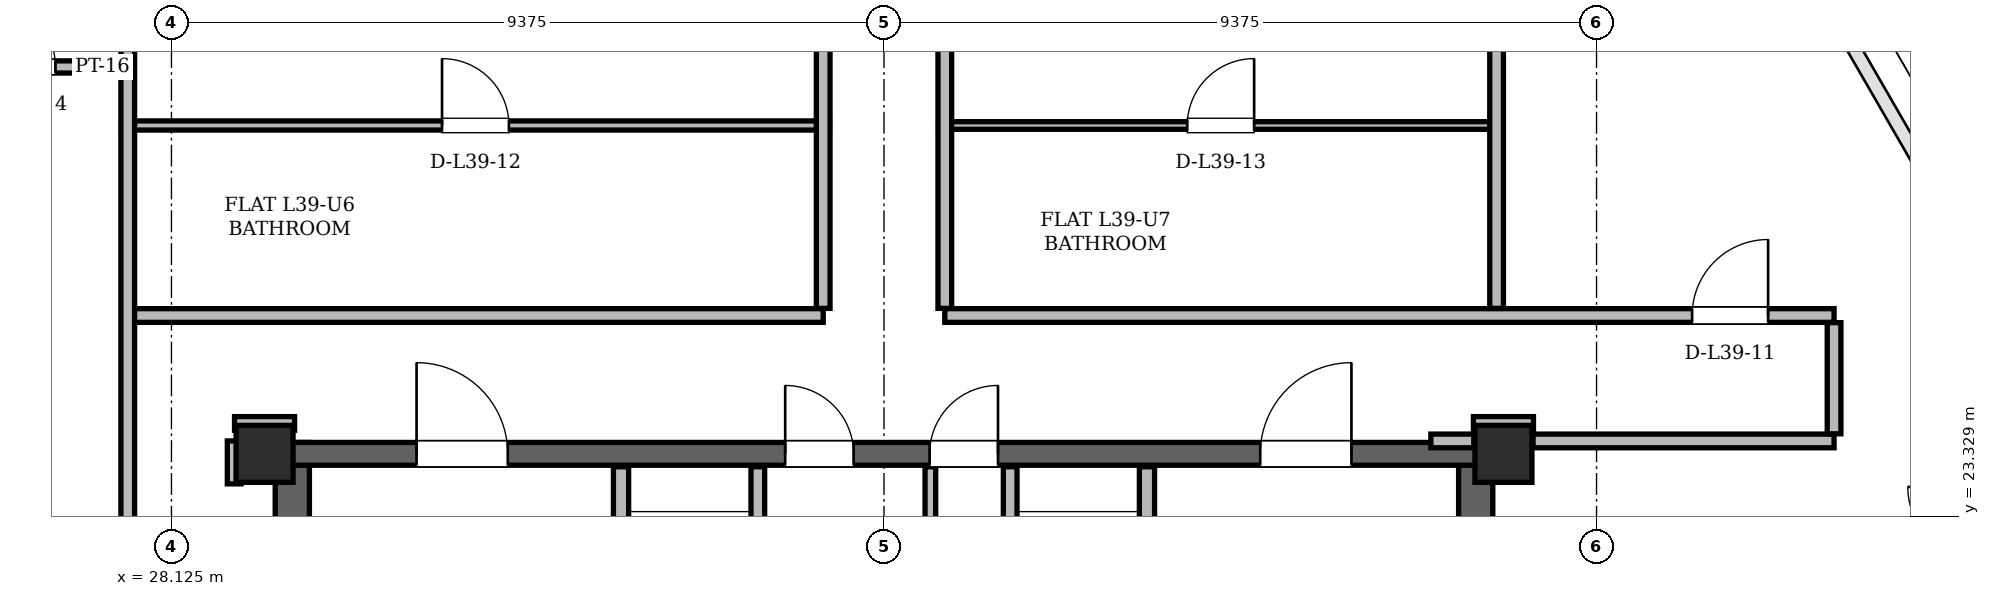
"""IFC4 building model, lengths in metres.
Left out: names, types, materials, properties, quantities, classifications, styles, units other than length and angle.
Written with IfcOpenShell. Run it as: python <this file> out.ifc"""

import sys

from ifc_helpers import new_model, si_unit, direction, frame, frame_2d, origin, origin_2d, place, context, subcontext, project, spatial, rectangle, hollow_rectangle, extrude, element, fill, save


model = new_model("IFC4")
c1 = context("Model", 3, precision=1e-05, world=origin(), true_north=direction((0.0, 1.0)))
c2 = subcontext(c1, "Body", "Model", "MODEL_VIEW")
j1 = project(units=[si_unit("LENGTHUNIT", "METRE"), si_unit("PLANEANGLEUNIT", "RADIAN")], contexts=[c1])
p1 = place(None, origin())
s1 = spatial("IfcSite", under=j1, at=p1, CompositionType="ELEMENT")
p2 = place(p1, origin())
s2 = spatial("IfcBuilding", under=s1, at=p2, CompositionType="ELEMENT")
p3 = place(p2, frame((0.0, 0.0, 149.4)))
s3 = spatial("IfcBuildingStorey", under=s2, at=p3, CompositionType="ELEMENT", Elevation=149.4)
for number, where, z_axis, x_axis in (
    (1, (45.65, 24.15, 0.0), (0.0, 0.0, 1.0), (1.0, 0.0, 0.0)),
    (2, (29.35, 24.15, 0.0), (0.0, 0.0, 1.0), (1.0, 0.0, 0.0)),
):
    element("IfcColumn", number, at=place(p3, frame(where, z_axis=z_axis, x_axis=x_axis)), inside=s3, PredefinedType="COLUMN", context=c2, shape_type="SweptSolid", body=[
        extrude(hollow_rectangle(XDim=0.75, YDim=0.75, WallThickness=0.06, at=origin_2d()), origin(), (0.0, 0.0, 1.0), 3.6),
    ])
for number, where, z_axis, x_axis in (
    (3, (29.715, 11.0, 0.0), (0.0, 0.0, 1.0), (0.0, 1.0, 0.0)),
    (4, (45.285, 11.0, 0.0), (0.0, 0.0, 1.0), (0.0, 1.0, 0.0)),
):
    element("IfcWall", number, at=place(p3, frame(where, z_axis=z_axis, x_axis=x_axis)), inside=s3, PredefinedType="SHEAR", context=c2, shape_type="SweptSolid", body=[
        extrude(rectangle(XDim=13.3, YDim=0.45, at=frame_2d((6.65, 0.0))), origin(), (0.0, 0.0, 1.0), 3.38),
    ])
p4 = place(p3, frame((29.65, 24.15, 0.0), z_axis=(0.0, 0.0, 1.0), x_axis=(1.0, 0.0, 0.0)))
e5 = element("IfcWall", 5, at=p4, inside=s3, PredefinedType="SHEAR", context=c2, shape_type="SweptSolid", body=[
    extrude(rectangle(XDim=15.7, YDim=0.3, at=frame_2d((7.85, 0.0))), origin(), (0.0, 0.0, 1.0), 3.38),
])
p5 = place(p4, frame((1.7, 0.0, 0.0)))
e6 = element("IfcOpeningElement", 6, at=p5, cuts=e5, PredefinedType="OPENING", context=c2, shape_type="SweptSolid", body=[
    extrude(rectangle(XDim=1.2, YDim=2.2, at=frame_2d((0.6, 1.1))), frame((0.0, 0.15, 0.0), z_axis=(0.0, -1.0, 0.0), x_axis=(1.0, 0.0, 0.0)), (0.0, 0.0, 1.0), 0.3),
])
p6 = place(p4, frame((12.8, 0.0, 0.0)))
e7 = element("IfcOpeningElement", 7, at=p6, cuts=e5, PredefinedType="OPENING", context=c2, shape_type="SweptSolid", body=[
    extrude(rectangle(XDim=1.2, YDim=2.2, at=frame_2d((0.6, 1.1))), frame((0.0, 0.15, 0.0), z_axis=(0.0, -1.0, 0.0), x_axis=(1.0, 0.0, 0.0)), (0.0, 0.0, 1.0), 0.3),
])
p7 = place(p4, frame((6.55, 0.0, 0.0)))
e8 = element("IfcOpeningElement", 8, at=p7, cuts=e5, PredefinedType="OPENING", context=c2, shape_type="SweptSolid", body=[
    extrude(rectangle(XDim=0.9, YDim=2.05, at=frame_2d((0.45, 1.025))), frame((0.0, 0.15, 0.0), z_axis=(0.0, -1.0, 0.0), x_axis=(1.0, 0.0, 0.0)), (0.0, 0.0, 1.0), 0.3),
])
p8 = place(p4, frame((8.45, 0.0, 0.0)))
e9 = element("IfcOpeningElement", 9, at=p8, cuts=e5, PredefinedType="OPENING", context=c2, shape_type="SweptSolid", body=[
    extrude(rectangle(XDim=0.9, YDim=2.05, at=frame_2d((0.45, 1.025))), frame((0.0, 0.15, 0.0), z_axis=(0.0, -1.0, 0.0), x_axis=(1.0, 0.0, 0.0)), (0.0, 0.0, 1.0), 0.3),
])
p9 = place(p3, frame((32.734, 43.331, 0.0), z_axis=(0.0, 0.0, 1.0), x_axis=(-0.499998697515, -0.866026155773, 0.0)))
e10 = element("IfcWall", 10, at=p9, inside=s3, PredefinedType="SOLIDWALL", context=c2, shape_type="SweptSolid", body=[
    extrude(rectangle(XDim=35.472, YDim=0.34, at=frame_2d((17.736, 0.0))), origin(), (0.0, 0.0, 1.0), 2.6),
])
p10 = place(p9, frame((8.034, 0.0, 0.0)))
e11 = element("IfcOpeningElement", 11, at=p10, cuts=e10, PredefinedType="OPENING", context=c2, shape_type="SweptSolid", body=[
    extrude(rectangle(XDim=1.5, YDim=2.2, at=frame_2d((0.75, 1.1))), frame((0.0, 0.17, 0.0), z_axis=(0.0, -1.0, 0.0), x_axis=(1.0, 0.0, 0.0)), (0.0, 0.0, 1.0), 0.34),
])
p11 = place(p9, frame((26.973, 0.0, 0.0)))
e12 = element("IfcOpeningElement", 12, at=p11, cuts=e10, PredefinedType="OPENING", context=c2, shape_type="SweptSolid", body=[
    extrude(rectangle(XDim=1.5, YDim=2.2, at=frame_2d((0.75, 1.1))), frame((0.0, 0.17, 0.0), z_axis=(0.0, -1.0, 0.0), x_axis=(1.0, 0.0, 0.0)), (0.0, 0.0, 1.0), 0.34),
])
p12 = place(p9, frame((33.0, 0.0, 0.85)))
e13 = element("IfcOpeningElement", 13, at=p12, cuts=e10, PredefinedType="OPENING", context=c2, shape_type="SweptSolid", body=[
    extrude(rectangle(XDim=1.2, YDim=1.48, at=frame_2d((0.6, 0.74))), frame((0.0, 0.17, 0.0), z_axis=(0.0, -1.0, 0.0), x_axis=(1.0, 0.0, 0.0)), (0.0, 0.0, 1.0), 0.34),
])
p13 = place(p9, frame((17.767, 0.0, 0.85)))
e14 = element("IfcOpeningElement", 14, at=p13, cuts=e10, PredefinedType="OPENING", context=c2, shape_type="SweptSolid", body=[
    extrude(rectangle(XDim=1.2, YDim=1.48, at=frame_2d((0.6, 0.74))), frame((0.0, 0.17, 0.0), z_axis=(0.0, -1.0, 0.0), x_axis=(1.0, 0.0, 0.0)), (0.0, 0.0, 1.0), 0.34),
])
p14 = place(p9, frame((11.513, 0.0, 0.85)))
e15 = element("IfcOpeningElement", 15, at=p14, cuts=e10, PredefinedType="OPENING", context=c2, shape_type="SweptSolid", body=[
    extrude(rectangle(XDim=1.2, YDim=1.48, at=frame_2d((0.6, 0.74))), frame((0.0, 0.17, 0.0), z_axis=(0.0, -1.0, 0.0), x_axis=(1.0, 0.0, 0.0)), (0.0, 0.0, 1.0), 0.34),
])
p15 = place(p9, frame((14.179, 0.0, 0.85)))
e16 = element("IfcOpeningElement", 16, at=p15, cuts=e10, PredefinedType="OPENING", context=c2, shape_type="SweptSolid", body=[
    extrude(rectangle(XDim=1.2, YDim=1.48, at=frame_2d((0.6, 0.74))), frame((0.0, 0.17, 0.0), z_axis=(0.0, -1.0, 0.0), x_axis=(1.0, 0.0, 0.0)), (0.0, 0.0, 1.0), 0.34),
])
p16 = place(p9, frame((2.823, 0.0, 0.85)))
e17 = element("IfcOpeningElement", 17, at=p16, cuts=e10, PredefinedType="OPENING", context=c2, shape_type="SweptSolid", body=[
    extrude(rectangle(XDim=1.6, YDim=1.64, at=frame_2d((0.8, 0.82))), frame((0.0, 0.17, 0.0), z_axis=(0.0, -1.0, 0.0), x_axis=(1.0, 0.0, 0.0)), (0.0, 0.0, 1.0), 0.34),
])
p17 = place(p3, frame((34.04, 19.48, 0.0), z_axis=(0.0, 0.0, 1.0), x_axis=(0.0, 1.0, 0.0)))
e18 = element("IfcWall", 18, at=p17, inside=s3, PredefinedType="PARTITIONING", context=c2, shape_type="SweptSolid", body=[
    extrude(rectangle(XDim=4.5, YDim=0.2, at=frame_2d((2.25, 0.0))), origin(), (0.0, 0.0, 1.0), 2.42),
])
p18 = place(p17, frame((2.12, 0.0, 0.0)))
e19 = element("IfcOpeningElement", 19, at=p18, cuts=e18, PredefinedType="OPENING", context=c2, shape_type="SweptSolid", body=[
    extrude(rectangle(XDim=1.1, YDim=2.2, at=frame_2d((0.55, 1.1))), frame((0.0, 0.1, 0.0), z_axis=(0.0, -1.0, 0.0), x_axis=(1.0, 0.0, 0.0)), (0.0, 0.0, 1.0), 0.2),
])
p19 = place(p3, frame((35.84, 20.96, 0.0), z_axis=(0.0, 0.0, 1.0), x_axis=(0.0, 1.0, 0.0)))
e20 = element("IfcWall", 20, at=p19, inside=s3, PredefinedType="PARTITIONING", context=c2, shape_type="SweptSolid", body=[
    extrude(rectangle(XDim=3.02, YDim=0.18, at=frame_2d((1.51, 0.0))), origin(), (0.0, 0.0, 1.0), 2.42),
])
p20 = place(p3, frame((40.96, 19.48, 0.0), z_axis=(0.0, 0.0, 1.0), x_axis=(0.0, 1.0, 0.0)))
e21 = element("IfcWall", 21, at=p20, inside=s3, PredefinedType="PARTITIONING", context=c2, shape_type="SweptSolid", body=[
    extrude(rectangle(XDim=4.5, YDim=0.2, at=frame_2d((2.25, 0.0))), origin(), (0.0, 0.0, 1.0), 2.42),
])
p21 = place(p20, frame((2.12, 0.0, 0.0)))
e22 = element("IfcOpeningElement", 22, at=p21, cuts=e21, PredefinedType="OPENING", context=c2, shape_type="SweptSolid", body=[
    extrude(rectangle(XDim=1.1, YDim=2.2, at=frame_2d((0.55, 1.1))), frame((0.0, 0.1, 0.0), z_axis=(0.0, -1.0, 0.0), x_axis=(1.0, 0.0, 0.0)), (0.0, 0.0, 1.0), 0.2),
])
p22 = place(p3, frame((39.16, 20.96, 0.0), z_axis=(0.0, 0.0, 1.0), x_axis=(0.0, 1.0, 0.0)))
e23 = element("IfcWall", 23, at=p22, inside=s3, PredefinedType="PARTITIONING", context=c2, shape_type="SweptSolid", body=[
    extrude(rectangle(XDim=3.02, YDim=0.18, at=frame_2d((1.51, 0.0))), origin(), (0.0, 0.0, 1.0), 2.42),
])
p23 = place(p3, frame((38.11, 21.06, 0.0), z_axis=(0.0, 0.0, 1.0), x_axis=(0.0, 1.0, 0.0)))
e24 = element("IfcWall", 24, at=p23, inside=s3, PredefinedType="PARTITIONING", context=c2, shape_type="SweptSolid", body=[
    extrude(rectangle(XDim=2.92, YDim=0.14, at=frame_2d((1.46, 0.0))), origin(), (0.0, 0.0, 1.0), 2.42),
])
p24 = place(p3, frame((44.695, 24.32, 0.0), z_axis=(0.0, 0.0, 1.0), x_axis=(1.0, 0.0, 0.0)))
e25 = element("IfcWall", 25, at=p24, inside=s3, PredefinedType="PARTITIONING", context=c2, shape_type="SweptSolid", body=[
    extrude(rectangle(XDim=0.565, YDim=0.18, at=frame_2d((0.282, 0.0))), origin(), (0.0, 0.0, 1.0), 2.42),
])
p25 = place(p3, frame((46.04, 24.32, 0.0), z_axis=(0.0, 0.0, 1.0), x_axis=(1.0, 0.0, 0.0)))
e26 = element("IfcWall", 26, at=p25, inside=s3, PredefinedType="PARTITIONING", context=c2, shape_type="SweptSolid", body=[
    extrude(rectangle(XDim=3.96, YDim=0.18, at=frame_2d((1.98, 0.0))), origin(), (0.0, 0.0, 1.0), 3.38),
])
for number, where, z_axis, x_axis in (
    (27, (28.955, 24.55, 0.0), (0.0, 0.0, 1.0), (1.0, 0.0, 0.0)),
    (28, (45.255, 24.55, 0.0), (0.0, 0.0, 1.0), (1.0, 0.0, 0.0)),
):
    element("IfcWall", number, at=place(p3, frame(where, z_axis=z_axis, x_axis=x_axis)), inside=s3, PredefinedType="PARTITIONING", context=c2, shape_type="SweptSolid", body=[
        extrude(rectangle(XDim=0.79, YDim=0.18, at=frame_2d((0.395, 0.0))), origin(), (0.0, 0.0, 1.0), 2.842),
    ])
p26 = place(p3, frame((27.55, 25.97, 0.0), z_axis=(0.0, 0.0, 1.0), x_axis=(1.0, 0.0, 0.0)))
e29 = element("IfcWall", 29, at=p26, inside=s3, PredefinedType="PARTITIONING", context=c2, shape_type="SweptSolid", body=[
    extrude(rectangle(XDim=9.15, YDim=0.18, at=frame_2d((4.575, 0.0))), origin(), (0.0, 0.0, 1.0), 2.842),
])
p27 = place(p3, frame((38.3, 25.97, 0.0), z_axis=(0.0, 0.0, 1.0), x_axis=(1.0, 0.0, 0.0)))
e30 = element("IfcWall", 30, at=p27, inside=s3, PredefinedType="PARTITIONING", context=c2, shape_type="SweptSolid", body=[
    extrude(rectangle(XDim=11.7, YDim=0.18, at=frame_2d((5.85, 0.0))), origin(), (0.0, 0.0, 1.0), 2.842),
])
p28 = place(p27, frame((9.832, 0.0, 0.0)))
e31 = element("IfcOpeningElement", 31, at=p28, cuts=e30, PredefinedType="OPENING", context=c2, shape_type="SweptSolid", body=[
    extrude(rectangle(XDim=1.0, YDim=2.18, at=frame_2d((0.5, 1.09))), frame((0.0, 0.09, 0.0), z_axis=(0.0, -1.0, 0.0), x_axis=(1.0, 0.0, 0.0)), (0.0, 0.0, 1.0), 0.18),
])
p29 = place(p3, frame((27.468, 28.47, 0.0), z_axis=(0.0, 0.0, 1.0), x_axis=(1.0, 0.0, 0.0)))
e32 = element("IfcWall", 32, at=p29, inside=s3, PredefinedType="PARTITIONING", context=c2, shape_type="SweptSolid", body=[
    extrude(rectangle(XDim=9.314, YDim=0.12, at=frame_2d((4.657, 0.0))), origin(), (0.0, 0.0, 1.0), 3.38),
])
p30 = place(p29, frame((4.217, 0.0, 0.0)))
e33 = element("IfcOpeningElement", 33, at=p30, cuts=e32, PredefinedType="OPENING", context=c2, shape_type="SweptSolid", body=[
    extrude(rectangle(XDim=0.88, YDim=2.08, at=frame_2d((0.44, 1.04))), frame((0.0, 0.06, 0.0), z_axis=(0.0, -1.0, 0.0), x_axis=(1.0, 0.0, 0.0)), (0.0, 0.0, 1.0), 0.12),
])
p31 = place(p3, frame((38.218, 28.47, 0.0), z_axis=(0.0, 0.0, 1.0), x_axis=(1.0, 0.0, 0.0)))
e34 = element("IfcWall", 34, at=p31, inside=s3, PredefinedType="PARTITIONING", context=c2, shape_type="SweptSolid", body=[
    extrude(rectangle(XDim=7.424, YDim=0.1, at=frame_2d((3.712, 0.0))), origin(), (0.0, 0.0, 1.0), 3.38),
])
p32 = place(p31, frame((3.272, 0.0, 0.0)))
e35 = element("IfcOpeningElement", 35, at=p32, cuts=e34, PredefinedType="OPENING", context=c2, shape_type="SweptSolid", body=[
    extrude(rectangle(XDim=0.88, YDim=2.08, at=frame_2d((0.44, 1.04))), frame((0.0, 0.05, 0.0), z_axis=(0.0, -1.0, 0.0), x_axis=(1.0, 0.0, 0.0)), (0.0, 0.0, 1.0), 0.1),
])
p33 = place(p3, frame((24.799, 29.24, 0.0), z_axis=(0.0, 0.0, 1.0), x_axis=(1.0, 0.0, 0.0)))
e36 = element("IfcWall", 36, at=p33, inside=s3, PredefinedType="PARTITIONING", context=c2, shape_type="SweptSolid", body=[
    extrude(rectangle(XDim=2.833, YDim=0.16, at=frame_2d((1.417, 0.0))), origin(), (0.0, 0.0, 1.0), 3.38),
])
p34 = place(p33, frame((0.92, 0.0, 0.0)))
e37 = element("IfcOpeningElement", 37, at=p34, cuts=e36, PredefinedType="OPENING", context=c2, shape_type="SweptSolid", body=[
    extrude(rectangle(XDim=0.88, YDim=2.08, at=frame_2d((0.44, 1.04))), frame((0.0, 0.08, 0.0), z_axis=(0.0, -1.0, 0.0), x_axis=(1.0, 0.0, 0.0)), (0.0, 0.0, 1.0), 0.16),
])
p35 = place(p3, frame((27.55, 18.544, 0.0), z_axis=(0.0, 0.0, 1.0), x_axis=(0.0, 1.0, 0.0)))
e38 = element("IfcWall", 38, at=p35, inside=s3, PredefinedType="PARTITIONING", context=c2, shape_type="SweptSolid", body=[
    extrude(rectangle(XDim=15.344, YDim=0.18, at=frame_2d((7.672, 0.0))), origin(), (0.0, 0.0, 1.0), 3.38),
])
p36 = place(p3, frame((28.95, 23.755, 0.0), z_axis=(0.0, 0.0, 1.0), x_axis=(0.0, 1.0, 0.0)))
e39 = element("IfcWall", 39, at=p36, inside=s3, PredefinedType="PARTITIONING", context=c2, shape_type="SweptSolid", body=[
    extrude(rectangle(XDim=0.565, YDim=0.18, at=frame_2d((0.283, 0.0))), origin(), (0.0, 0.0, 1.0), 3.38),
])
p37 = place(p3, frame((36.7, 26.064, 0.0), z_axis=(0.0, 0.0, 1.0), x_axis=(0.0, 1.0, 0.0)))
e40 = element("IfcWall", 40, at=p37, inside=s3, PredefinedType="PARTITIONING", context=c2, shape_type="SweptSolid", body=[
    extrude(rectangle(XDim=17.094, YDim=0.18, at=frame_2d((8.547, 0.0))), origin(), (0.0, 0.0, 1.0), 3.38),
])
p38 = place(p37, frame((7.15, 0.0, 0.0)))
e41 = element("IfcOpeningElement", 41, at=p38, cuts=e40, PredefinedType="OPENING", context=c2, shape_type="SweptSolid", body=[
    extrude(rectangle(XDim=1.0, YDim=2.18, at=frame_2d((0.5, 1.09))), frame((0.0, 0.09, 0.0), z_axis=(0.0, -1.0, 0.0), x_axis=(1.0, 0.0, 0.0)), (0.0, 0.0, 1.0), 0.18),
])
p39 = place(p3, frame((38.3, 26.064, 0.0), z_axis=(0.0, 0.0, 1.0), x_axis=(0.0, 1.0, 0.0)))
e42 = element("IfcWall", 42, at=p39, inside=s3, PredefinedType="PARTITIONING", context=c2, shape_type="SweptSolid", body=[
    extrude(rectangle(XDim=13.442, YDim=0.18, at=frame_2d((6.721, 0.0))), origin(), (0.0, 0.0, 1.0), 3.38),
])
p40 = place(p39, frame((7.15, 0.0, 0.0)))
e43 = element("IfcOpeningElement", 43, at=p40, cuts=e42, PredefinedType="OPENING", context=c2, shape_type="SweptSolid", body=[
    extrude(rectangle(XDim=1.0, YDim=2.18, at=frame_2d((0.5, 1.09))), frame((0.0, 0.09, 0.0), z_axis=(0.0, -1.0, 0.0), x_axis=(1.0, 0.0, 0.0)), (0.0, 0.0, 1.0), 0.18),
])
p41 = place(p3, frame((45.56, 26.064, 0.0), z_axis=(0.0, 0.0, 1.0), x_axis=(0.0, 1.0, 0.0)))
e44 = element("IfcWall", 44, at=p41, inside=s3, PredefinedType="PARTITIONING", context=c2, shape_type="SweptSolid", body=[
    extrude(rectangle(XDim=11.214, YDim=0.18, at=frame_2d((5.607, 0.0))), origin(), (0.0, 0.0, 1.0), 3.38),
])
p42 = place(p3, frame((50.0, 24.414, 0.0), z_axis=(0.0, 0.0, 1.0), x_axis=(0.0, 1.0, 0.0)))
e45 = element("IfcWall", 45, at=p42, inside=s3, PredefinedType="PARTITIONING", context=c2, shape_type="SweptSolid", body=[
    extrude(rectangle(XDim=1.462, YDim=0.18, at=frame_2d((0.731, 0.0))), origin(), (0.0, 0.0, 1.0), 3.38),
])
p43 = place(p5, origin())
e46 = element("IfcDoor", 46, at=p43, inside=s3, OperationType="SINGLE_SWING_LEFT", PredefinedType="DOOR", context=c2, shape_type="SweptSolid", body=[
    extrude(rectangle(XDim=1.2, YDim=2.2, at=frame_2d((0.6, 1.1))), frame((0.0, 0.025, 0.0), z_axis=(0.0, -1.0, 0.0), x_axis=(1.0, 0.0, 0.0)), (0.0, 0.0, 1.0), 0.05),
])
fill(e6, e46)
p44 = place(p6, origin())
e47 = element("IfcDoor", 47, at=p44, inside=s3, OperationType="SINGLE_SWING_RIGHT", PredefinedType="DOOR", context=c2, shape_type="SweptSolid", body=[
    extrude(rectangle(XDim=1.2, YDim=2.2, at=frame_2d((0.6, 1.1))), frame((0.0, 0.025, 0.0), z_axis=(0.0, -1.0, 0.0), x_axis=(1.0, 0.0, 0.0)), (0.0, 0.0, 1.0), 0.05),
])
fill(e7, e47)
p45 = place(p7, origin())
e48 = element("IfcDoor", 48, at=p45, inside=s3, OperationType="SINGLE_SWING_LEFT", PredefinedType="DOOR", context=c2, shape_type="SweptSolid", body=[
    extrude(rectangle(XDim=0.9, YDim=2.05, at=frame_2d((0.45, 1.025))), frame((0.0, 0.025, 0.0), z_axis=(0.0, -1.0, 0.0), x_axis=(1.0, 0.0, 0.0)), (0.0, 0.0, 1.0), 0.05),
])
fill(e8, e48)
p46 = place(p8, origin())
e49 = element("IfcDoor", 49, at=p46, inside=s3, OperationType="SINGLE_SWING_RIGHT", PredefinedType="DOOR", context=c2, shape_type="SweptSolid", body=[
    extrude(rectangle(XDim=0.9, YDim=2.05, at=frame_2d((0.45, 1.025))), frame((0.0, 0.025, 0.0), z_axis=(0.0, -1.0, 0.0), x_axis=(1.0, 0.0, 0.0)), (0.0, 0.0, 1.0), 0.05),
])
fill(e9, e49)
p47 = place(p28, origin())
e50 = element("IfcDoor", 50, at=p47, inside=s3, OperationType="SINGLE_SWING_RIGHT", PredefinedType="DOOR", context=c2, shape_type="SweptSolid", body=[
    extrude(rectangle(XDim=1.0, YDim=2.18, at=frame_2d((0.5, 1.09))), frame((0.0, 0.025, 0.0), z_axis=(0.0, -1.0, 0.0), x_axis=(1.0, 0.0, 0.0)), (0.0, 0.0, 1.0), 0.05),
])
fill(e31, e50)
p48 = place(p30, origin())
e51 = element("IfcDoor", 51, at=p48, inside=s3, OperationType="SINGLE_SWING_LEFT", PredefinedType="DOOR", context=c2, shape_type="SweptSolid", body=[
    extrude(rectangle(XDim=0.88, YDim=2.08, at=frame_2d((0.44, 1.04))), frame((0.0, 0.025, 0.0), z_axis=(0.0, -1.0, 0.0), x_axis=(1.0, 0.0, 0.0)), (0.0, 0.0, 1.0), 0.05),
])
fill(e33, e51)
p49 = place(p32, origin())
e52 = element("IfcDoor", 52, at=p49, inside=s3, OperationType="SINGLE_SWING_RIGHT", PredefinedType="DOOR", context=c2, shape_type="SweptSolid", body=[
    extrude(rectangle(XDim=0.88, YDim=2.08, at=frame_2d((0.44, 1.04))), frame((0.0, 0.025, 0.0), z_axis=(0.0, -1.0, 0.0), x_axis=(1.0, 0.0, 0.0)), (0.0, 0.0, 1.0), 0.05),
])
fill(e35, e52)
p50 = place(p34, origin())
e53 = element("IfcDoor", 53, at=p50, inside=s3, OperationType="SINGLE_SWING_LEFT", PredefinedType="DOOR", context=c2, shape_type="SweptSolid", body=[
    extrude(rectangle(XDim=0.88, YDim=2.08, at=frame_2d((0.44, 1.04))), frame((0.0, 0.025, 0.0), z_axis=(0.0, -1.0, 0.0), x_axis=(1.0, 0.0, 0.0)), (0.0, 0.0, 1.0), 0.05),
])
fill(e37, e53)
save(model, sys.argv[1])
